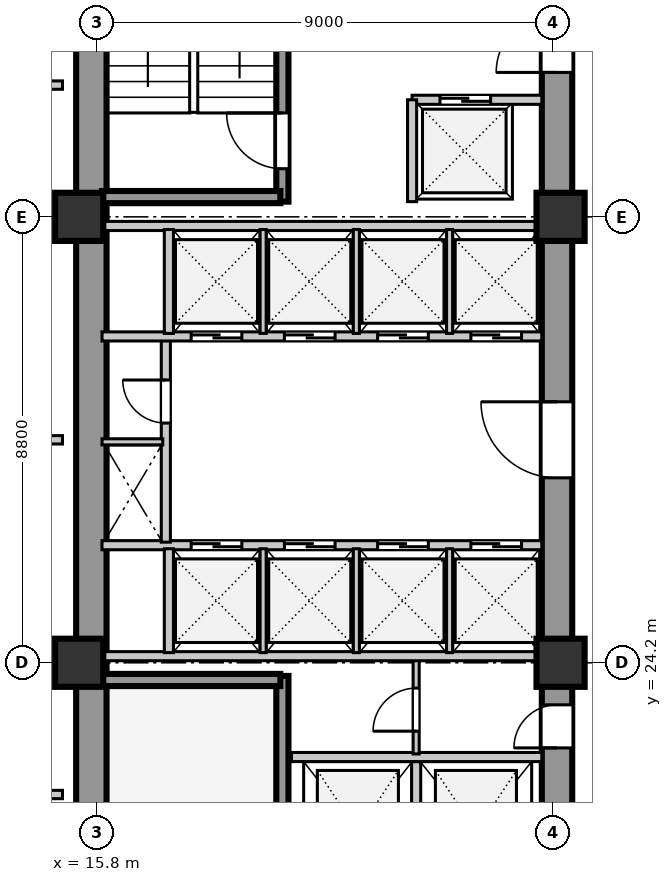
"""IFC4 building model, lengths in metres.
Left out: names, types, materials, properties, quantities, classifications, styles, units other than length and angle.
Written with IfcOpenShell. Run it as: python <this file> out.ifc"""

import sys

from ifc_helpers import new_model, si_unit, direction, frame, frame_2d, origin, origin_2d, place, context, subcontext, project, spatial, rectangle, extrude, element, fill, save


model = new_model("IFC4")
c1 = context("Model", 3, precision=1e-05, world=origin(), true_north=direction((0.0, 1.0)))
c2 = subcontext(c1, "Body", "Model", "MODEL_VIEW")
j1 = project(units=[si_unit("LENGTHUNIT", "METRE"), si_unit("PLANEANGLEUNIT", "RADIAN")], contexts=[c1])
p1 = place(None, origin())
s1 = spatial("IfcSite", under=j1, at=p1, CompositionType="ELEMENT")
p2 = place(p1, origin())
s2 = spatial("IfcBuilding", under=s1, at=p2, CompositionType="ELEMENT")
p3 = place(p2, frame((0.0, 0.0, 21.5)))
s3 = spatial("IfcBuildingStorey", under=s2, at=p3, CompositionType="ELEMENT", Elevation=21.5)
p4 = place(p3, frame((15.69, 15.81, 0.0), z_axis=(0.0, 0.0, 1.0), x_axis=(0.0, 1.0, 0.0)))
e1 = element("IfcWall", 1, at=p4, inside=s3, PredefinedType="SHEAR", context=c2, shape_type="SweptSolid", body=[
    extrude(rectangle(XDim=25.63, YDim=0.6, at=frame_2d((12.815, 0.0))), origin(), (0.0, 0.0, 1.0), 4.22),
])
p5 = place(p3, frame((24.88, 15.74, 0.0), z_axis=(0.0, 0.0, 1.0), x_axis=(0.0, 1.0, 0.0)))
e2 = element("IfcWall", 2, at=p5, inside=s3, PredefinedType="SHEAR", context=c2, shape_type="SweptSolid", body=[
    extrude(rectangle(XDim=25.76, YDim=0.6, at=frame_2d((12.88, 0.0))), origin(), (0.0, 0.0, 1.0), 4.22),
])
p6 = place(p5, frame((1.61, 0.0, 0.0)))
e3 = element("IfcOpeningElement", 3, at=p6, cuts=e2, PredefinedType="OPENING", context=c2, shape_type="SweptSolid", body=[
    extrude(rectangle(XDim=1.2, YDim=2.1, at=frame_2d((0.6, 1.05))), frame((0.0, 0.31, 0.0), z_axis=(0.0, -1.0, 0.0), x_axis=(1.0, 0.0, 0.0)), (0.0, 0.0, 1.0), 0.62),
])
p7 = place(p5, frame((6.78, 0.0, 0.0)))
e4 = element("IfcOpeningElement", 4, at=p7, cuts=e2, PredefinedType="OPENING", context=c2, shape_type="SweptSolid", body=[
    extrude(rectangle(XDim=0.85, YDim=2.06, at=frame_2d((0.425, 1.03))), frame((0.0, 0.31, 0.0), z_axis=(0.0, -1.0, 0.0), x_axis=(1.0, 0.0, 0.0)), (0.0, 0.0, 1.0), 0.62),
])
p8 = place(p5, frame((12.11, 0.0, 0.0)))
e5 = element("IfcOpeningElement", 5, at=p8, cuts=e2, PredefinedType="OPENING", context=c2, shape_type="SweptSolid", body=[
    extrude(rectangle(XDim=1.5, YDim=2.12, at=frame_2d((0.75, 1.06))), frame((0.0, 0.31, 0.0), z_axis=(0.0, -1.0, 0.0), x_axis=(1.0, 0.0, 0.0)), (0.0, 0.0, 1.0), 0.62),
])
p9 = place(p5, frame((20.11, 0.0, 0.0)))
e6 = element("IfcOpeningElement", 6, at=p9, cuts=e2, PredefinedType="OPENING", context=c2, shape_type="SweptSolid", body=[
    extrude(rectangle(XDim=1.2, YDim=2.12, at=frame_2d((0.6, 1.06))), frame((0.0, 0.31, 0.0), z_axis=(0.0, -1.0, 0.0), x_axis=(1.0, 0.0, 0.0)), (0.0, 0.0, 1.0), 0.62),
])
p10 = place(p5, frame((24.01, 0.0, 0.0)))
e7 = element("IfcOpeningElement", 7, at=p10, cuts=e2, PredefinedType="OPENING", context=c2, shape_type="SweptSolid", body=[
    extrude(rectangle(XDim=0.95, YDim=2.1, at=frame_2d((0.475, 1.05))), frame((0.0, 0.31, 0.0), z_axis=(0.0, -1.0, 0.0), x_axis=(1.0, 0.0, 0.0)), (0.0, 0.0, 1.0), 0.62),
])
for number, where, z_axis, x_axis in (
    (8, (15.45, 24.2, 0.0), (0.0, 0.0, 1.0), (1.0, 0.0, 0.0)),
    (9, (15.45, 33.0, 0.0), (0.0, 0.0, 1.0), (1.0, 0.0, 0.0)),
    (10, (24.95, 24.2, 0.0), (0.0, 0.0, 1.0), (1.0, 0.0, 0.0)),
    (11, (24.95, 33.0, 0.0), (0.0, 0.0, 1.0), (1.0, 0.0, 0.0)),
):
    element("IfcColumn", number, at=place(p3, frame(where, z_axis=z_axis, x_axis=x_axis)), inside=s3, PredefinedType="COLUMN", context=c2, shape_type="SweptSolid", body=[
        extrude(rectangle(XDim=0.95, YDim=0.95, at=origin_2d()), origin(), (0.0, 0.0, 1.0), 4.22),
    ])
p11 = place(p3, frame((19.46, 15.74, 0.0), z_axis=(0.0, 0.0, 1.0), x_axis=(0.0, 1.0, 0.0)))
e12 = element("IfcWall", 12, at=p11, inside=s3, PredefinedType="SHEAR", context=c2, shape_type="SweptSolid", body=[
    extrude(rectangle(XDim=8.2, YDim=0.24, at=frame_2d((4.1, 0.0))), origin(), (0.0, 0.0, 1.0), 4.5),
])
p12 = place(p11, frame((0.45, 0.0, 0.0)))
e13 = element("IfcOpeningElement", 13, at=p12, cuts=e12, PredefinedType="OPENING", context=c2, shape_type="SweptSolid", body=[
    extrude(rectangle(XDim=1.1, YDim=2.1, at=frame_2d((0.55, 1.05))), frame((0.0, 0.13, 0.0), z_axis=(0.0, -1.0, 0.0), x_axis=(1.0, 0.0, 0.0)), (0.0, 0.0, 1.0), 0.26),
])
p13 = place(p3, frame((15.9, 23.86, 0.0), z_axis=(0.0, 0.0, 1.0), x_axis=(1.0, 0.0, 0.0)))
e14 = element("IfcWall", 14, at=p13, inside=s3, PredefinedType="SHEAR", context=c2, shape_type="SweptSolid", body=[
    extrude(rectangle(XDim=3.52, YDim=0.24, at=frame_2d((1.76, 0.0))), origin(), (0.0, 0.0, 1.0), 4.5),
])
p14 = place(p3, frame((22.1, 19.51, 0.0), z_axis=(0.0, 0.0, 1.0), x_axis=(0.0, 1.0, 0.0)))
e15 = element("IfcWall", 15, at=p14, inside=s3, PredefinedType="SOLIDWALL", context=c2, shape_type="SweptSolid", body=[
    extrude(rectangle(XDim=2.74, YDim=0.18, at=frame_2d((1.37, 0.0))), origin(), (0.0, 0.0, 1.0), 4.22),
])
p15 = place(p3, frame((19.64, 22.34, 0.0), z_axis=(0.0, 0.0, 1.0), x_axis=(1.0, 0.0, 0.0)))
e16 = element("IfcWall", 16, at=p15, inside=s3, PredefinedType="SOLIDWALL", context=c2, shape_type="SweptSolid", body=[
    extrude(rectangle(XDim=4.94, YDim=0.18, at=frame_2d((2.47, 0.0))), origin(), (0.0, 0.0, 1.0), 4.22),
])
p16 = place(p3, frame((22.1, 22.4, 0.0), z_axis=(0.0, 0.0, 1.0), x_axis=(0.0, 1.0, 0.0)))
e17 = element("IfcWall", 17, at=p16, inside=s3, PredefinedType="PARTITIONING", context=c2, shape_type="SweptSolid", body=[
    extrude(rectangle(XDim=1.88, YDim=0.12, at=frame_2d((0.94, 0.0))), origin(), (0.0, 0.0, 1.0), 4.22),
])
p17 = place(p16, frame((0.45, 0.0, 0.0)))
e18 = element("IfcOpeningElement", 18, at=p17, cuts=e17, PredefinedType="OPENING", context=c2, shape_type="SweptSolid", body=[
    extrude(rectangle(XDim=0.85, YDim=2.06, at=frame_2d((0.425, 1.03))), frame((0.0, 0.07, 0.0), z_axis=(0.0, -1.0, 0.0), x_axis=(1.0, 0.0, 0.0)), (0.0, 0.0, 1.0), 0.14),
])
p18 = place(p3, frame((15.9, 26.52, 0.0), z_axis=(0.0, 0.0, 1.0), x_axis=(1.0, 0.0, 0.0)))
e19 = element("IfcWall", 19, at=p18, inside=s3, PredefinedType="SOLIDWALL", context=c2, shape_type="SweptSolid", body=[
    extrude(rectangle(XDim=8.68, YDim=0.18, at=frame_2d((4.34, 0.0))), origin(), (0.0, 0.0, 1.0), 4.22),
])
p19 = place(p18, frame((1.76, 0.0, 0.0)))
e20 = element("IfcOpeningElement", 20, at=p19, cuts=e19, PredefinedType="OPENING", context=c2, shape_type="SweptSolid", body=[
    extrude(rectangle(XDim=1.0, YDim=2.1, at=frame_2d((0.5, 1.05))), frame((0.0, 0.1, 0.0), z_axis=(0.0, -1.0, 0.0), x_axis=(1.0, 0.0, 0.0)), (0.0, 0.0, 1.0), 0.2),
])
p20 = place(p18, frame((3.6, 0.0, 0.0)))
e21 = element("IfcOpeningElement", 21, at=p20, cuts=e19, PredefinedType="OPENING", context=c2, shape_type="SweptSolid", body=[
    extrude(rectangle(XDim=1.0, YDim=2.1, at=frame_2d((0.5, 1.05))), frame((0.0, 0.1, 0.0), z_axis=(0.0, -1.0, 0.0), x_axis=(1.0, 0.0, 0.0)), (0.0, 0.0, 1.0), 0.2),
])
p21 = place(p18, frame((5.44, 0.0, 0.0)))
e22 = element("IfcOpeningElement", 22, at=p21, cuts=e19, PredefinedType="OPENING", context=c2, shape_type="SweptSolid", body=[
    extrude(rectangle(XDim=1.0, YDim=2.1, at=frame_2d((0.5, 1.05))), frame((0.0, 0.1, 0.0), z_axis=(0.0, -1.0, 0.0), x_axis=(1.0, 0.0, 0.0)), (0.0, 0.0, 1.0), 0.2),
])
p22 = place(p18, frame((7.28, 0.0, 0.0)))
e23 = element("IfcOpeningElement", 23, at=p22, cuts=e19, PredefinedType="OPENING", context=c2, shape_type="SweptSolid", body=[
    extrude(rectangle(XDim=1.0, YDim=2.1, at=frame_2d((0.5, 1.05))), frame((0.0, 0.1, 0.0), z_axis=(0.0, -1.0, 0.0), x_axis=(1.0, 0.0, 0.0)), (0.0, 0.0, 1.0), 0.2),
])
p23 = place(p3, frame((15.9, 24.33, 0.0), z_axis=(0.0, 0.0, 1.0), x_axis=(1.0, 0.0, 0.0)))
e24 = element("IfcWall", 24, at=p23, inside=s3, PredefinedType="SOLIDWALL", context=c2, shape_type="SweptSolid", body=[
    extrude(rectangle(XDim=8.68, YDim=0.18, at=frame_2d((4.34, 0.0))), origin(), (0.0, 0.0, 1.0), 3.42),
])
p24 = place(p3, frame((17.22, 24.4, 0.0), z_axis=(0.0, 0.0, 1.0), x_axis=(0.0, 1.0, 0.0)))
e25 = element("IfcWall", 25, at=p24, inside=s3, PredefinedType="SOLIDWALL", context=c2, shape_type="SweptSolid", body=[
    extrude(rectangle(XDim=2.05, YDim=0.18, at=frame_2d((1.025, 0.0))), origin(), (0.0, 0.0, 1.0), 4.22),
])
for number, where, z_axis, x_axis in (
    (26, (19.08, 24.4, 0.0), (0.0, 0.0, 1.0), (0.0, 1.0, 0.0)),
    (27, (20.92, 24.4, 0.0), (0.0, 0.0, 1.0), (0.0, 1.0, 0.0)),
    (28, (22.76, 24.4, 0.0), (0.0, 0.0, 1.0), (0.0, 1.0, 0.0)),
):
    element("IfcWall", number, at=place(p3, frame(where, z_axis=z_axis, x_axis=x_axis)), inside=s3, PredefinedType="PARTITIONING", context=c2, shape_type="SweptSolid", body=[
        extrude(rectangle(XDim=2.05, YDim=0.12, at=frame_2d((1.025, 0.0))), origin(), (0.0, 0.0, 1.0), 4.22),
    ])
p25 = place(p3, frame((17.16, 26.58, 0.0), z_axis=(0.0, 0.0, 1.0), x_axis=(0.0, 1.0, 0.0)))
e29 = element("IfcWall", 29, at=p25, inside=s3, PredefinedType="SOLIDWALL", context=c2, shape_type="SweptSolid", body=[
    extrude(rectangle(XDim=4.02, YDim=0.18, at=frame_2d((2.01, 0.0))), origin(), (0.0, 0.0, 1.0), 4.22),
])
p26 = place(p25, frame((2.35, 0.0, 0.0)))
e30 = element("IfcOpeningElement", 30, at=p26, cuts=e29, PredefinedType="OPENING", context=c2, shape_type="SweptSolid", body=[
    extrude(rectangle(XDim=0.85, YDim=2.06, at=frame_2d((0.425, 1.03))), frame((0.0, 0.1, 0.0), z_axis=(0.0, -1.0, 0.0), x_axis=(1.0, 0.0, 0.0)), (0.0, 0.0, 1.0), 0.2),
])
p27 = place(p3, frame((15.9, 28.56, 0.0), z_axis=(0.0, 0.0, 1.0), x_axis=(1.0, 0.0, 0.0)))
e31 = element("IfcWall", 31, at=p27, inside=s3, PredefinedType="PARTITIONING", context=c2, shape_type="SweptSolid", body=[
    extrude(rectangle(XDim=1.2, YDim=0.12, at=frame_2d((0.6, 0.0))), origin(), (0.0, 0.0, 1.0), 4.22),
])
p28 = place(p3, frame((15.9, 30.64, 0.0), z_axis=(0.0, 0.0, 1.0), x_axis=(1.0, 0.0, 0.0)))
e32 = element("IfcWall", 32, at=p28, inside=s3, PredefinedType="SOLIDWALL", context=c2, shape_type="SweptSolid", body=[
    extrude(rectangle(XDim=8.68, YDim=0.18, at=frame_2d((4.34, 0.0))), origin(), (0.0, 0.0, 1.0), 4.22),
])
p29 = place(p28, frame((1.76, 0.0, 0.0)))
e33 = element("IfcOpeningElement", 33, at=p29, cuts=e32, PredefinedType="OPENING", context=c2, shape_type="SweptSolid", body=[
    extrude(rectangle(XDim=1.0, YDim=2.1, at=frame_2d((0.5, 1.05))), frame((0.0, 0.1, 0.0), z_axis=(0.0, -1.0, 0.0), x_axis=(1.0, 0.0, 0.0)), (0.0, 0.0, 1.0), 0.2),
])
p30 = place(p28, frame((3.6, 0.0, 0.0)))
e34 = element("IfcOpeningElement", 34, at=p30, cuts=e32, PredefinedType="OPENING", context=c2, shape_type="SweptSolid", body=[
    extrude(rectangle(XDim=1.0, YDim=2.1, at=frame_2d((0.5, 1.05))), frame((0.0, 0.1, 0.0), z_axis=(0.0, -1.0, 0.0), x_axis=(1.0, 0.0, 0.0)), (0.0, 0.0, 1.0), 0.2),
])
p31 = place(p28, frame((5.44, 0.0, 0.0)))
e35 = element("IfcOpeningElement", 35, at=p31, cuts=e32, PredefinedType="OPENING", context=c2, shape_type="SweptSolid", body=[
    extrude(rectangle(XDim=1.0, YDim=2.1, at=frame_2d((0.5, 1.05))), frame((0.0, 0.1, 0.0), z_axis=(0.0, -1.0, 0.0), x_axis=(1.0, 0.0, 0.0)), (0.0, 0.0, 1.0), 0.2),
])
p32 = place(p28, frame((7.28, 0.0, 0.0)))
e36 = element("IfcOpeningElement", 36, at=p32, cuts=e32, PredefinedType="OPENING", context=c2, shape_type="SweptSolid", body=[
    extrude(rectangle(XDim=1.0, YDim=2.1, at=frame_2d((0.5, 1.05))), frame((0.0, 0.1, 0.0), z_axis=(0.0, -1.0, 0.0), x_axis=(1.0, 0.0, 0.0)), (0.0, 0.0, 1.0), 0.2),
])
p33 = place(p3, frame((15.9, 32.82, 0.0), z_axis=(0.0, 0.0, 1.0), x_axis=(1.0, 0.0, 0.0)))
e37 = element("IfcWall", 37, at=p33, inside=s3, PredefinedType="SOLIDWALL", context=c2, shape_type="SweptSolid", body=[
    extrude(rectangle(XDim=8.68, YDim=0.18, at=frame_2d((4.34, 0.0))), origin(), (0.0, 0.0, 1.0), 3.42),
])
p34 = place(p3, frame((17.22, 30.7, 0.0), z_axis=(0.0, 0.0, 1.0), x_axis=(0.0, 1.0, 0.0)))
e38 = element("IfcWall", 38, at=p34, inside=s3, PredefinedType="SOLIDWALL", context=c2, shape_type="SweptSolid", body=[
    extrude(rectangle(XDim=2.05, YDim=0.18, at=frame_2d((1.025, 0.0))), origin(), (0.0, 0.0, 1.0), 4.22),
])
for number, where, z_axis, x_axis in (
    (39, (19.08, 30.7, 0.0), (0.0, 0.0, 1.0), (0.0, 1.0, 0.0)),
    (40, (20.92, 30.7, 0.0), (0.0, 0.0, 1.0), (0.0, 1.0, 0.0)),
    (41, (22.76, 30.7, 0.0), (0.0, 0.0, 1.0), (0.0, 1.0, 0.0)),
):
    element("IfcWall", number, at=place(p3, frame(where, z_axis=z_axis, x_axis=x_axis)), inside=s3, PredefinedType="PARTITIONING", context=c2, shape_type="SweptSolid", body=[
        extrude(rectangle(XDim=2.05, YDim=0.12, at=frame_2d((1.025, 0.0))), origin(), (0.0, 0.0, 1.0), 4.22),
    ])
p35 = place(p3, frame((19.46, 33.3, 0.0), z_axis=(0.0, 0.0, 1.0), x_axis=(0.0, 1.0, 0.0)))
e42 = element("IfcWall", 42, at=p35, inside=s3, PredefinedType="SHEAR", context=c2, shape_type="SweptSolid", body=[
    extrude(rectangle(XDim=8.18, YDim=0.24, at=frame_2d((4.09, 0.0))), origin(), (0.0, 0.0, 1.0), 4.5),
])
p36 = place(p35, frame((0.65, 0.0, 0.0)))
e43 = element("IfcOpeningElement", 43, at=p36, cuts=e42, PredefinedType="OPENING", context=c2, shape_type="SweptSolid", body=[
    extrude(rectangle(XDim=1.1, YDim=2.1, at=frame_2d((0.55, 1.05))), frame((0.0, 0.13, 0.0), z_axis=(0.0, -1.0, 0.0), x_axis=(1.0, 0.0, 0.0)), (0.0, 0.0, 1.0), 0.26),
])
p37 = place(p3, frame((15.9, 33.39, 0.0), z_axis=(0.0, 0.0, 1.0), x_axis=(1.0, 0.0, 0.0)))
e44 = element("IfcWall", 44, at=p37, inside=s3, PredefinedType="SHEAR", context=c2, shape_type="SweptSolid", body=[
    extrude(rectangle(XDim=3.52, YDim=0.24, at=frame_2d((1.76, 0.0))), origin(), (0.0, 0.0, 1.0), 4.5),
])
p38 = place(p3, frame((22.02, 35.31, 0.0), z_axis=(0.0, 0.0, 1.0), x_axis=(1.0, 0.0, 0.0)))
e45 = element("IfcWall", 45, at=p38, inside=s3, PredefinedType="SOLIDWALL", context=c2, shape_type="SweptSolid", body=[
    extrude(rectangle(XDim=2.56, YDim=0.18, at=frame_2d((1.28, 0.0))), origin(), (0.0, 0.0, 1.0), 4.22),
])
p39 = place(p38, frame((0.55, 0.0, 0.0)))
e46 = element("IfcOpeningElement", 46, at=p39, cuts=e45, PredefinedType="OPENING", context=c2, shape_type="SweptSolid", body=[
    extrude(rectangle(XDim=1.0, YDim=2.1, at=frame_2d((0.5, 1.05))), frame((0.0, 0.1, 0.0), z_axis=(0.0, -1.0, 0.0), x_axis=(1.0, 0.0, 0.0)), (0.0, 0.0, 1.0), 0.2),
])
p40 = place(p3, frame((22.02, 33.3, 0.0), z_axis=(0.0, 0.0, 1.0), x_axis=(0.0, 1.0, 0.0)))
e47 = element("IfcWall", 47, at=p40, inside=s3, PredefinedType="SOLIDWALL", context=c2, shape_type="SweptSolid", body=[
    extrude(rectangle(XDim=2.01, YDim=0.18, at=frame_2d((1.005, 0.0))), origin(), (0.0, 0.0, 1.0), 4.22),
])
for number, where, z_axis, x_axis in (
    (48, (6.88, 21.6, 0.0), (0.0, 0.0, 1.0), (1.0, 0.0, 0.0)),
    (49, (6.88, 28.6, 0.0), (0.0, 0.0, 1.0), (1.0, 0.0, 0.0)),
    (50, (6.88, 35.6, 0.0), (0.0, 0.0, 1.0), (1.0, 0.0, 0.0)),
):
    element("IfcWall", number, at=place(p3, frame(where, z_axis=z_axis, x_axis=x_axis)), inside=s3, PredefinedType="PARTITIONING", context=c2, shape_type="SweptSolid", body=[
        extrude(rectangle(XDim=8.24, YDim=0.165, at=frame_2d((4.12, 0.0))), origin(), (0.0, 0.0, 1.0), 4.22),
    ])
p41 = place(p17, origin())
e51 = element("IfcDoor", 51, at=p41, inside=s3, OperationType="SINGLE_SWING_LEFT", PredefinedType="DOOR", context=c2, shape_type="SweptSolid", body=[
    extrude(rectangle(XDim=0.85, YDim=2.06, at=frame_2d((0.425, 1.03))), frame((0.0, 0.025, 0.0), z_axis=(0.0, -1.0, 0.0), x_axis=(1.0, 0.0, 0.0)), (0.0, 0.0, 1.0), 0.05),
])
fill(e18, e51)
p42 = place(p7, frame((0.85, 0.0, 0.0), z_axis=(0.0, 0.0, 1.0), x_axis=(-1.0, 0.0, 0.0)))
e52 = element("IfcDoor", 52, at=p42, inside=s3, OperationType="SINGLE_SWING_RIGHT", PredefinedType="DOOR", context=c2, shape_type="SweptSolid", body=[
    extrude(rectangle(XDim=0.85, YDim=2.06, at=frame_2d((0.425, 1.03))), frame((0.0, 0.025, 0.0), z_axis=(0.0, -1.0, 0.0), x_axis=(1.0, 0.0, 0.0)), (0.0, 0.0, 1.0), 0.05),
])
fill(e4, e52)
p43 = place(p19, origin())
e53 = element("IfcDoor", 53, at=p43, inside=s3, OperationType="DOUBLE_DOOR_SLIDING", PredefinedType="DOOR", context=c2, shape_type="SweptSolid", body=[
    extrude(rectangle(XDim=1.0, YDim=2.1, at=frame_2d((0.5, 1.05))), frame((0.0, 0.025, 0.0), z_axis=(0.0, -1.0, 0.0), x_axis=(1.0, 0.0, 0.0)), (0.0, 0.0, 1.0), 0.05),
])
fill(e20, e53)
p44 = place(p20, origin())
e54 = element("IfcDoor", 54, at=p44, inside=s3, OperationType="DOUBLE_DOOR_SLIDING", PredefinedType="DOOR", context=c2, shape_type="SweptSolid", body=[
    extrude(rectangle(XDim=1.0, YDim=2.1, at=frame_2d((0.5, 1.05))), frame((0.0, 0.025, 0.0), z_axis=(0.0, -1.0, 0.0), x_axis=(1.0, 0.0, 0.0)), (0.0, 0.0, 1.0), 0.05),
])
fill(e21, e54)
p45 = place(p21, origin())
e55 = element("IfcDoor", 55, at=p45, inside=s3, OperationType="DOUBLE_DOOR_SLIDING", PredefinedType="DOOR", context=c2, shape_type="SweptSolid", body=[
    extrude(rectangle(XDim=1.0, YDim=2.1, at=frame_2d((0.5, 1.05))), frame((0.0, 0.025, 0.0), z_axis=(0.0, -1.0, 0.0), x_axis=(1.0, 0.0, 0.0)), (0.0, 0.0, 1.0), 0.05),
])
fill(e22, e55)
p46 = place(p22, origin())
e56 = element("IfcDoor", 56, at=p46, inside=s3, OperationType="DOUBLE_DOOR_SLIDING", PredefinedType="DOOR", context=c2, shape_type="SweptSolid", body=[
    extrude(rectangle(XDim=1.0, YDim=2.1, at=frame_2d((0.5, 1.05))), frame((0.0, 0.025, 0.0), z_axis=(0.0, -1.0, 0.0), x_axis=(1.0, 0.0, 0.0)), (0.0, 0.0, 1.0), 0.05),
])
fill(e23, e56)
p47 = place(p26, origin())
e57 = element("IfcDoor", 57, at=p47, inside=s3, OperationType="SINGLE_SWING_RIGHT", PredefinedType="DOOR", context=c2, shape_type="SweptSolid", body=[
    extrude(rectangle(XDim=0.85, YDim=2.06, at=frame_2d((0.425, 1.03))), frame((0.0, 0.025, 0.0), z_axis=(0.0, -1.0, 0.0), x_axis=(1.0, 0.0, 0.0)), (0.0, 0.0, 1.0), 0.05),
])
fill(e30, e57)
p48 = place(p8, frame((1.5, 0.0, 0.0), z_axis=(0.0, 0.0, 1.0), x_axis=(-1.0, 0.0, 0.0)))
e58 = element("IfcDoor", 58, at=p48, inside=s3, OperationType="SINGLE_SWING_LEFT", PredefinedType="DOOR", context=c2, shape_type="SweptSolid", body=[
    extrude(rectangle(XDim=1.5, YDim=2.12, at=frame_2d((0.75, 1.06))), frame((0.0, 0.025, 0.0), z_axis=(0.0, -1.0, 0.0), x_axis=(1.0, 0.0, 0.0)), (0.0, 0.0, 1.0), 0.05),
])
fill(e5, e58)
p49 = place(p29, frame((1.0, 0.0, 0.0), z_axis=(0.0, 0.0, 1.0), x_axis=(-1.0, 0.0, 0.0)))
e59 = element("IfcDoor", 59, at=p49, inside=s3, OperationType="DOUBLE_DOOR_SLIDING", PredefinedType="DOOR", context=c2, shape_type="SweptSolid", body=[
    extrude(rectangle(XDim=1.0, YDim=2.1, at=frame_2d((0.5, 1.05))), frame((0.0, 0.025, 0.0), z_axis=(0.0, -1.0, 0.0), x_axis=(1.0, 0.0, 0.0)), (0.0, 0.0, 1.0), 0.05),
])
fill(e33, e59)
p50 = place(p30, frame((1.0, 0.0, 0.0), z_axis=(0.0, 0.0, 1.0), x_axis=(-1.0, 0.0, 0.0)))
e60 = element("IfcDoor", 60, at=p50, inside=s3, OperationType="DOUBLE_DOOR_SLIDING", PredefinedType="DOOR", context=c2, shape_type="SweptSolid", body=[
    extrude(rectangle(XDim=1.0, YDim=2.1, at=frame_2d((0.5, 1.05))), frame((0.0, 0.025, 0.0), z_axis=(0.0, -1.0, 0.0), x_axis=(1.0, 0.0, 0.0)), (0.0, 0.0, 1.0), 0.05),
])
fill(e34, e60)
p51 = place(p31, frame((1.0, 0.0, 0.0), z_axis=(0.0, 0.0, 1.0), x_axis=(-1.0, 0.0, 0.0)))
e61 = element("IfcDoor", 61, at=p51, inside=s3, OperationType="DOUBLE_DOOR_SLIDING", PredefinedType="DOOR", context=c2, shape_type="SweptSolid", body=[
    extrude(rectangle(XDim=1.0, YDim=2.1, at=frame_2d((0.5, 1.05))), frame((0.0, 0.025, 0.0), z_axis=(0.0, -1.0, 0.0), x_axis=(1.0, 0.0, 0.0)), (0.0, 0.0, 1.0), 0.05),
])
fill(e35, e61)
p52 = place(p32, frame((1.0, 0.0, 0.0), z_axis=(0.0, 0.0, 1.0), x_axis=(-1.0, 0.0, 0.0)))
e62 = element("IfcDoor", 62, at=p52, inside=s3, OperationType="DOUBLE_DOOR_SLIDING", PredefinedType="DOOR", context=c2, shape_type="SweptSolid", body=[
    extrude(rectangle(XDim=1.0, YDim=2.1, at=frame_2d((0.5, 1.05))), frame((0.0, 0.025, 0.0), z_axis=(0.0, -1.0, 0.0), x_axis=(1.0, 0.0, 0.0)), (0.0, 0.0, 1.0), 0.05),
])
fill(e36, e62)
p53 = place(p36, origin())
e63 = element("IfcDoor", 63, at=p53, inside=s3, OperationType="SINGLE_SWING_RIGHT", PredefinedType="DOOR", context=c2, shape_type="SweptSolid", body=[
    extrude(rectangle(XDim=1.1, YDim=2.1, at=frame_2d((0.55, 1.05))), frame((0.0, 0.025, 0.0), z_axis=(0.0, -1.0, 0.0), x_axis=(1.0, 0.0, 0.0)), (0.0, 0.0, 1.0), 0.05),
])
fill(e43, e63)
p54 = place(p9, frame((1.2, 0.0, 0.0), z_axis=(0.0, 0.0, 1.0), x_axis=(-1.0, 0.0, 0.0)))
e64 = element("IfcDoor", 64, at=p54, inside=s3, OperationType="SINGLE_SWING_RIGHT", PredefinedType="DOOR", context=c2, shape_type="SweptSolid", body=[
    extrude(rectangle(XDim=1.2, YDim=2.12, at=frame_2d((0.6, 1.06))), frame((0.0, 0.025, 0.0), z_axis=(0.0, -1.0, 0.0), x_axis=(1.0, 0.0, 0.0)), (0.0, 0.0, 1.0), 0.05),
])
fill(e6, e64)
p55 = place(p39, origin())
e65 = element("IfcDoor", 65, at=p55, inside=s3, OperationType="DOUBLE_DOOR_SLIDING", PredefinedType="DOOR", context=c2, shape_type="SweptSolid", body=[
    extrude(rectangle(XDim=1.0, YDim=2.1, at=frame_2d((0.5, 1.05))), frame((0.0, 0.025, 0.0), z_axis=(0.0, -1.0, 0.0), x_axis=(1.0, 0.0, 0.0)), (0.0, 0.0, 1.0), 0.05),
])
fill(e46, e65)
save(model, sys.argv[1])
